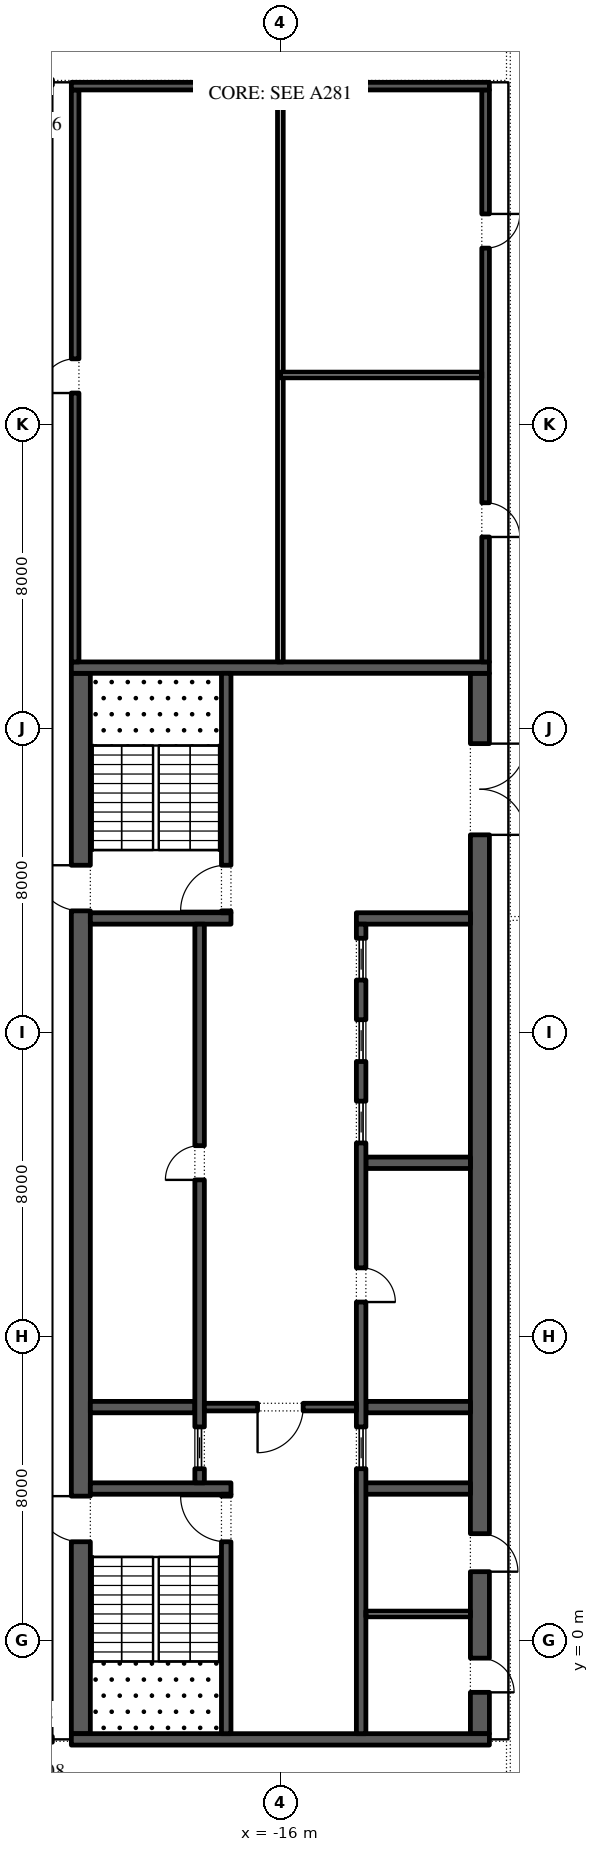
"""IFC4 building model, lengths in metres.
Left out: names, types, materials, properties, quantities, classifications, styles, units other than length and angle.
Written with IfcOpenShell. Run it as: python <this file> out.ifc"""

import sys

from ifc_helpers import new_model, si_unit, direction, frame, frame_2d, origin, place, context, subcontext, project, spatial, rectangle, extrude, element, fill, save


model = new_model("IFC4")
c1 = context("Model", 3, precision=1e-05, world=origin(), true_north=direction((0.0, 1.0)))
c2 = subcontext(c1, "Body", "Model", "MODEL_VIEW")
j1 = project(units=[si_unit("LENGTHUNIT", "METRE"), si_unit("PLANEANGLEUNIT", "RADIAN")], contexts=[c1])
p1 = place(None, origin())
s1 = spatial("IfcSite", under=j1, at=p1, CompositionType="ELEMENT")
p2 = place(p1, origin())
s2 = spatial("IfcBuilding", under=s1, at=p2, CompositionType="ELEMENT")
p3 = place(p2, frame((0.0, 0.0, 355.2)))
s3 = spatial("IfcBuildingStorey", under=s2, at=p3, CompositionType="ELEMENT", Elevation=355.2)
p4 = place(p3, frame((-21.25, -2.45, 0.0), z_axis=(0.0, 0.0, 1.0), x_axis=(0.0, 1.0, 0.0)))
e1 = element("IfcWall", 1, at=p4, inside=s3, PredefinedType="SHEAR", context=c2, shape_type="SweptSolid", body=[
    extrude(rectangle(XDim=27.9, YDim=0.5, at=frame_2d((13.95, 0.0))), origin(), (0.0, 0.0, 1.0), 3.95),
])
p5 = place(p4, frame((5.05, 0.0, 0.0)))
e2 = element("IfcOpeningElement", 2, at=p5, cuts=e1, PredefinedType="OPENING", context=c2, shape_type="SweptSolid", body=[
    extrude(rectangle(XDim=1.2, YDim=2.1, at=frame_2d((0.6, 1.05))), frame((0.0, 0.26, 0.0), z_axis=(0.0, -1.0, 0.0), x_axis=(1.0, 0.0, 0.0)), (0.0, 0.0, 1.0), 0.52),
])
p6 = place(p4, frame((21.65, 0.0, 0.0)))
e3 = element("IfcOpeningElement", 3, at=p6, cuts=e1, PredefinedType="OPENING", context=c2, shape_type="SweptSolid", body=[
    extrude(rectangle(XDim=1.2, YDim=2.1, at=frame_2d((0.6, 1.05))), frame((0.0, 0.26, 0.0), z_axis=(0.0, -1.0, 0.0), x_axis=(1.0, 0.0, 0.0)), (0.0, 0.0, 1.0), 0.52),
])
p7 = place(p3, frame((-10.75, -2.45, 0.0), z_axis=(0.0, 0.0, 1.0), x_axis=(0.0, 1.0, 0.0)))
e4 = element("IfcWall", 4, at=p7, inside=s3, PredefinedType="SHEAR", context=c2, shape_type="SweptSolid", body=[
    extrude(rectangle(XDim=27.9, YDim=0.5, at=frame_2d((13.95, 0.0))), origin(), (0.0, 0.0, 1.0), 3.95),
])
p8 = place(p7, frame((23.65, 0.0, 0.0)))
e5 = element("IfcOpeningElement", 5, at=p8, cuts=e4, PredefinedType="OPENING", context=c2, shape_type="SweptSolid", body=[
    extrude(rectangle(XDim=2.4, YDim=2.1, at=frame_2d((1.2, 1.05))), frame((0.0, 0.26, 0.0), z_axis=(0.0, -1.0, 0.0), x_axis=(1.0, 0.0, 0.0)), (0.0, 0.0, 1.0), 0.52),
])
p9 = place(p7, frame((1.087, 0.0, 0.0)))
e6 = element("IfcOpeningElement", 6, at=p9, cuts=e4, PredefinedType="OPENING", context=c2, shape_type="SweptSolid", body=[
    extrude(rectangle(XDim=0.9, YDim=2.1, at=frame_2d((0.45, 1.05))), frame((0.0, 0.26, 0.0), z_axis=(0.0, -1.0, 0.0), x_axis=(1.0, 0.0, 0.0)), (0.0, 0.0, 1.0), 0.52),
])
p10 = place(p7, frame((4.262, 0.0, 0.0)))
e7 = element("IfcOpeningElement", 7, at=p10, cuts=e4, PredefinedType="OPENING", context=c2, shape_type="SweptSolid", body=[
    extrude(rectangle(XDim=1.0, YDim=2.1, at=frame_2d((0.5, 1.05))), frame((0.0, 0.26, 0.0), z_axis=(0.0, -1.0, 0.0), x_axis=(1.0, 0.0, 0.0)), (0.0, 0.0, 1.0), 0.52),
])
for number, where, z_axis, x_axis in (
    (8, (-21.5, -2.6, 0.0), (0.0, 0.0, 1.0), (1.0, 0.0, 0.0)),
    (9, (-21.5, 25.6, 0.0), (0.0, 0.0, 1.0), (1.0, 0.0, 0.0)),
):
    element("IfcWall", number, at=place(p3, frame(where, z_axis=z_axis, x_axis=x_axis)), inside=s3, PredefinedType="SHEAR", context=c2, shape_type="SweptSolid", body=[
        extrude(rectangle(XDim=11.0, YDim=0.3, at=frame_2d((5.5, 0.0))), origin(), (0.0, 0.0, 1.0), 3.95),
    ])
p11 = place(p3, frame((-21.0, 4.0, 0.0), z_axis=(0.0, 0.0, 1.0), x_axis=(1.0, 0.0, 0.0)))
e10 = element("IfcWall", 10, at=p11, inside=s3, PredefinedType="SHEAR", context=c2, shape_type="SweptSolid", body=[
    extrude(rectangle(XDim=3.7, YDim=0.3, at=frame_2d((1.85, 0.0))), origin(), (0.0, 0.0, 1.0), 3.95),
])
p12 = place(p3, frame((-17.425, -2.45, 0.0), z_axis=(0.0, 0.0, 1.0), x_axis=(0.0, 1.0, 0.0)))
e11 = element("IfcWall", 11, at=p12, inside=s3, PredefinedType="SHEAR", context=c2, shape_type="SweptSolid", body=[
    extrude(rectangle(XDim=6.3, YDim=0.25, at=frame_2d((3.15, 0.0))), origin(), (0.0, 0.0, 1.0), 3.95),
])
p13 = place(p12, frame((5.05, 0.0, 0.0)))
e12 = element("IfcOpeningElement", 12, at=p13, cuts=e11, PredefinedType="OPENING", context=c2, shape_type="SweptSolid", body=[
    extrude(rectangle(XDim=1.2, YDim=2.1, at=frame_2d((0.6, 1.05))), frame((0.0, 0.135, 0.0), z_axis=(0.0, -1.0, 0.0), x_axis=(1.0, 0.0, 0.0)), (0.0, 0.0, 1.0), 0.27),
])
p14 = place(p3, frame((-21.0, 19.0, 0.0), z_axis=(0.0, 0.0, 1.0), x_axis=(1.0, 0.0, 0.0)))
e13 = element("IfcWall", 13, at=p14, inside=s3, PredefinedType="SHEAR", context=c2, shape_type="SweptSolid", body=[
    extrude(rectangle(XDim=3.7, YDim=0.3, at=frame_2d((1.85, 0.0))), origin(), (0.0, 0.0, 1.0), 3.95),
])
p15 = place(p3, frame((-17.425, 19.15, 0.0), z_axis=(0.0, 0.0, 1.0), x_axis=(0.0, 1.0, 0.0)))
e14 = element("IfcWall", 14, at=p15, inside=s3, PredefinedType="SHEAR", context=c2, shape_type="SweptSolid", body=[
    extrude(rectangle(XDim=6.3, YDim=0.25, at=frame_2d((3.15, 0.0))), origin(), (0.0, 0.0, 1.0), 3.95),
])
p16 = place(p15, frame((0.05, 0.0, 0.0)))
e15 = element("IfcOpeningElement", 15, at=p16, cuts=e14, PredefinedType="OPENING", context=c2, shape_type="SweptSolid", body=[
    extrude(rectangle(XDim=1.2, YDim=2.1, at=frame_2d((0.6, 1.05))), frame((0.0, 0.135, 0.0), z_axis=(0.0, -1.0, 0.0), x_axis=(1.0, 0.0, 0.0)), (0.0, 0.0, 1.0), 0.27),
])
p17 = place(p3, frame((-21.0, 6.143, 0.0), z_axis=(0.0, 0.0, 1.0), x_axis=(1.0, 0.0, 0.0)))
e16 = element("IfcWall", 16, at=p17, inside=s3, PredefinedType="SHEAR", context=c2, shape_type="SweptSolid", body=[
    extrude(rectangle(XDim=2.75, YDim=0.3, at=frame_2d((1.375, 0.0))), origin(), (0.0, 0.0, 1.0), 3.95),
])
p18 = place(p3, frame((-18.125, 4.15, 0.0), z_axis=(0.0, 0.0, 1.0), x_axis=(0.0, 1.0, 0.0)))
e17 = element("IfcWall", 17, at=p18, inside=s3, PredefinedType="SHEAR", context=c2, shape_type="SweptSolid", body=[
    extrude(rectangle(XDim=14.7, YDim=0.25, at=frame_2d((7.35, 0.0))), origin(), (0.0, 0.0, 1.0), 3.95),
])
p19 = place(p18, frame((7.971, 0.0, 0.0)))
e18 = element("IfcOpeningElement", 18, at=p19, cuts=e17, PredefinedType="OPENING", context=c2, shape_type="SweptSolid", body=[
    extrude(rectangle(XDim=0.9, YDim=2.1, at=frame_2d((0.45, 1.05))), frame((0.0, 0.135, 0.0), z_axis=(0.0, -1.0, 0.0), x_axis=(1.0, 0.0, 0.0)), (0.0, 0.0, 1.0), 0.27),
])
p20 = place(p18, frame((0.371, 0.0, 0.0)))
e19 = element("IfcOpeningElement", 19, at=p20, cuts=e17, PredefinedType="OPENING", context=c2, shape_type="SweptSolid", body=[
    extrude(rectangle(XDim=1.1, YDim=2.1, at=frame_2d((0.55, 1.05))), frame((0.0, 0.135, 0.0), z_axis=(0.0, -1.0, 0.0), x_axis=(1.0, 0.0, 0.0)), (0.0, 0.0, 1.0), 0.27),
])
p21 = place(p3, frame((-14.0, 4.0, 0.0), z_axis=(0.0, 0.0, 1.0), x_axis=(1.0, 0.0, 0.0)))
e20 = element("IfcWall", 20, at=p21, inside=s3, PredefinedType="SHEAR", context=c2, shape_type="SweptSolid", body=[
    extrude(rectangle(XDim=3.0, YDim=0.3, at=frame_2d((1.5, 0.0))), origin(), (0.0, 0.0, 1.0), 3.95),
])
for number, where, z_axis, x_axis in (
    (21, (-13.75, 6.143, 0.0), (0.0, 0.0, 1.0), (1.0, 0.0, 0.0)),
    (22, (-13.75, 12.571, 0.0), (0.0, 0.0, 1.0), (1.0, 0.0, 0.0)),
):
    element("IfcWall", number, at=place(p3, frame(where, z_axis=z_axis, x_axis=x_axis)), inside=s3, PredefinedType="SHEAR", context=c2, shape_type="SweptSolid", body=[
        extrude(rectangle(XDim=2.75, YDim=0.3, at=frame_2d((1.375, 0.0))), origin(), (0.0, 0.0, 1.0), 3.95),
    ])
p22 = place(p3, frame((-14.0, 19.0, 0.0), z_axis=(0.0, 0.0, 1.0), x_axis=(1.0, 0.0, 0.0)))
e23 = element("IfcWall", 23, at=p22, inside=s3, PredefinedType="SHEAR", context=c2, shape_type="SweptSolid", body=[
    extrude(rectangle(XDim=3.0, YDim=0.3, at=frame_2d((1.5, 0.0))), origin(), (0.0, 0.0, 1.0), 3.95),
])
p23 = place(p3, frame((-13.875, -2.45, 0.0), z_axis=(0.0, 0.0, 1.0), x_axis=(0.0, 1.0, 0.0)))
e24 = element("IfcWall", 24, at=p23, inside=s3, PredefinedType="SHEAR", context=c2, shape_type="SweptSolid", body=[
    extrude(rectangle(XDim=21.3, YDim=0.25, at=frame_2d((10.65, 0.0))), origin(), (0.0, 0.0, 1.0), 3.95),
])
p24 = place(p23, frame((11.357, 0.0, 0.0)))
e25 = element("IfcOpeningElement", 25, at=p24, cuts=e24, PredefinedType="OPENING", context=c2, shape_type="SweptSolid", body=[
    extrude(rectangle(XDim=0.9, YDim=2.1, at=frame_2d((0.45, 1.05))), frame((0.0, 0.135, 0.0), z_axis=(0.0, -1.0, 0.0), x_axis=(1.0, 0.0, 0.0)), (0.0, 0.0, 1.0), 0.27),
])
p25 = place(p23, frame((6.971, 0.0, 0.0)))
e26 = element("IfcOpeningElement", 26, at=p25, cuts=e24, PredefinedType="OPENING", context=c2, shape_type="SweptSolid", body=[
    extrude(rectangle(XDim=1.1, YDim=2.1, at=frame_2d((0.55, 1.05))), frame((0.0, 0.135, 0.0), z_axis=(0.0, -1.0, 0.0), x_axis=(1.0, 0.0, 0.0)), (0.0, 0.0, 1.0), 0.27),
])
p26 = place(p23, frame((15.543, 0.0, 0.0)))
e27 = element("IfcOpeningElement", 27, at=p26, cuts=e24, PredefinedType="OPENING", context=c2, shape_type="SweptSolid", body=[
    extrude(rectangle(XDim=1.1, YDim=2.1, at=frame_2d((0.55, 1.05))), frame((0.0, 0.135, 0.0), z_axis=(0.0, -1.0, 0.0), x_axis=(1.0, 0.0, 0.0)), (0.0, 0.0, 1.0), 0.27),
])
p27 = place(p23, frame((17.686, 0.0, 0.0)))
e28 = element("IfcOpeningElement", 28, at=p27, cuts=e24, PredefinedType="OPENING", context=c2, shape_type="SweptSolid", body=[
    extrude(rectangle(XDim=1.1, YDim=2.1, at=frame_2d((0.55, 1.05))), frame((0.0, 0.135, 0.0), z_axis=(0.0, -1.0, 0.0), x_axis=(1.0, 0.0, 0.0)), (0.0, 0.0, 1.0), 0.27),
])
p28 = place(p23, frame((19.829, 0.0, 0.0)))
e29 = element("IfcOpeningElement", 29, at=p28, cuts=e24, PredefinedType="OPENING", context=c2, shape_type="SweptSolid", body=[
    extrude(rectangle(XDim=1.1, YDim=2.1, at=frame_2d((0.55, 1.05))), frame((0.0, 0.135, 0.0), z_axis=(0.0, -1.0, 0.0), x_axis=(1.0, 0.0, 0.0)), (0.0, 0.0, 1.0), 0.27),
])
p29 = place(p3, frame((-18.0, 6.143, 0.0), z_axis=(0.0, 0.0, 1.0), x_axis=(1.0, 0.0, 0.0)))
e30 = element("IfcWall", 30, at=p29, inside=s3, PredefinedType="SHEAR", context=c2, shape_type="SweptSolid", body=[
    extrude(rectangle(XDim=4.0, YDim=0.2, at=frame_2d((2.0, 0.0))), origin(), (0.0, 0.0, 1.0), 3.95),
])
p30 = place(p29, frame((1.4, 0.0, 0.0)))
e31 = element("IfcOpeningElement", 31, at=p30, cuts=e30, PredefinedType="OPENING", context=c2, shape_type="SweptSolid", body=[
    extrude(rectangle(XDim=1.2, YDim=2.1, at=frame_2d((0.6, 1.05))), frame((0.0, 0.11, 0.0), z_axis=(0.0, -1.0, 0.0), x_axis=(1.0, 0.0, 0.0)), (0.0, 0.0, 1.0), 0.22),
])
p31 = place(p3, frame((-13.75, 0.7, 0.0), z_axis=(0.0, 0.0, 1.0), x_axis=(1.0, 0.0, 0.0)))
e32 = element("IfcWall", 32, at=p31, inside=s3, PredefinedType="PARTITIONING", context=c2, shape_type="SweptSolid", body=[
    extrude(rectangle(XDim=2.75, YDim=0.15, at=frame_2d((1.375, 0.0))), origin(), (0.0, 0.0, 1.0), 3.95),
])
p32 = place(p3, frame((-21.4, 25.75, 0.0), z_axis=(0.0, 0.0, 1.0), x_axis=(0.0, 1.0, 0.0)))
e33 = element("IfcWall", 33, at=p32, inside=s3, PredefinedType="SHEAR", context=c2, shape_type="SweptSolid", body=[
    extrude(rectangle(XDim=15.05, YDim=0.2, at=frame_2d((7.525, 0.0))), origin(), (0.0, 0.0, 1.0), 3.95),
])
p33 = place(p32, frame((7.075, 0.0, 0.0)))
e34 = element("IfcOpeningElement", 34, at=p33, cuts=e33, PredefinedType="OPENING", context=c2, shape_type="SweptSolid", body=[
    extrude(rectangle(XDim=0.9, YDim=2.1, at=frame_2d((0.45, 1.05))), frame((0.0, 0.11, 0.0), z_axis=(0.0, -1.0, 0.0), x_axis=(1.0, 0.0, 0.0)), (0.0, 0.0, 1.0), 0.22),
])
p34 = place(p3, frame((-10.6, 25.75, 0.0), z_axis=(0.0, 0.0, 1.0), x_axis=(0.0, 1.0, 0.0)))
e35 = element("IfcWall", 35, at=p34, inside=s3, PredefinedType="SHEAR", context=c2, shape_type="SweptSolid", body=[
    extrude(rectangle(XDim=15.05, YDim=0.2, at=frame_2d((7.525, 0.0))), origin(), (0.0, 0.0, 1.0), 3.95),
])
p35 = place(p34, frame((3.288, 0.0, 0.0)))
e36 = element("IfcOpeningElement", 36, at=p35, cuts=e35, PredefinedType="OPENING", context=c2, shape_type="SweptSolid", body=[
    extrude(rectangle(XDim=0.9, YDim=2.1, at=frame_2d((0.45, 1.05))), frame((0.0, 0.11, 0.0), z_axis=(0.0, -1.0, 0.0), x_axis=(1.0, 0.0, 0.0)), (0.0, 0.0, 1.0), 0.22),
])
p36 = place(p34, frame((10.887, 0.0, 0.0)))
e37 = element("IfcOpeningElement", 37, at=p36, cuts=e35, PredefinedType="OPENING", context=c2, shape_type="SweptSolid", body=[
    extrude(rectangle(XDim=0.9, YDim=2.1, at=frame_2d((0.45, 1.05))), frame((0.0, 0.11, 0.0), z_axis=(0.0, -1.0, 0.0), x_axis=(1.0, 0.0, 0.0)), (0.0, 0.0, 1.0), 0.22),
])
p37 = place(p3, frame((-21.5, 40.9, 0.0), z_axis=(0.0, 0.0, 1.0), x_axis=(1.0, 0.0, 0.0)))
e38 = element("IfcWall", 38, at=p37, inside=s3, PredefinedType="SHEAR", context=c2, shape_type="SweptSolid", body=[
    extrude(rectangle(XDim=11.0, YDim=0.2, at=frame_2d((5.5, 0.0))), origin(), (0.0, 0.0, 1.0), 3.95),
])
p38 = place(p3, frame((-16.0, 25.75, 0.0), z_axis=(0.0, 0.0, 1.0), x_axis=(0.0, 1.0, 0.0)))
e39 = element("IfcWall", 39, at=p38, inside=s3, PredefinedType="PARTITIONING", context=c2, shape_type="SweptSolid", body=[
    extrude(rectangle(XDim=15.05, YDim=0.15, at=frame_2d((7.525, 0.0))), origin(), (0.0, 0.0, 1.0), 3.95),
])
p39 = place(p3, frame((-16.0, 33.3, 0.0), z_axis=(0.0, 0.0, 1.0), x_axis=(1.0, 0.0, 0.0)))
e40 = element("IfcWall", 40, at=p39, inside=s3, PredefinedType="PARTITIONING", context=c2, shape_type="SweptSolid", body=[
    extrude(rectangle(XDim=5.3, YDim=0.15, at=frame_2d((2.65, 0.0))), origin(), (0.0, 0.0, 1.0), 3.95),
])
p40 = place(p3, frame((-22.0, 41.0, 0.0), z_axis=(0.0, 0.0, 1.0), x_axis=(-1.0, 0.0, 0.0)))
e41 = element("IfcWall", 41, at=p40, inside=s3, PredefinedType="PARTITIONING", context=c2, shape_type="SweptSolid", body=[
    extrude(rectangle(XDim=4.05, YDim=0.15, at=frame_2d((2.025, 0.0))), origin(), (0.0, 0.0, 1.0), 3.95),
])
p41 = place(p40, frame((2.6, 0.0, 0.0)))
e42 = element("IfcOpeningElement", 42, at=p41, cuts=e41, PredefinedType="OPENING", context=c2, shape_type="SweptSolid", body=[
    extrude(rectangle(XDim=1.0, YDim=2.1, at=frame_2d((0.5, 1.05))), frame((0.0, 0.085, 0.0), z_axis=(0.0, -1.0, 0.0), x_axis=(1.0, 0.0, 0.0)), (0.0, 0.0, 1.0), 0.17),
])
p42 = place(p19, origin())
e43 = element("IfcDoor", 43, at=p42, inside=s3, OperationType="SINGLE_SWING_RIGHT", PredefinedType="DOOR", context=c2, shape_type="SweptSolid", body=[
    extrude(rectangle(XDim=0.9, YDim=2.1, at=frame_2d((0.45, 1.05))), frame((0.0, 0.125, 0.0), z_axis=(0.0, -1.0, 0.0), x_axis=(1.0, 0.0, 0.0)), (0.0, 0.0, 1.0), 0.05),
])
fill(e18, e43)
p43 = place(p20, origin())
e44 = element("IfcDoor", 44, at=p43, inside=s3, OperationType="SLIDING_TO_LEFT", PredefinedType="DOOR", context=c2, shape_type="SweptSolid", body=[
    extrude(rectangle(XDim=1.1, YDim=2.1, at=frame_2d((0.55, 1.05))), frame((0.0, 0.025, 0.0), z_axis=(0.0, -1.0, 0.0), x_axis=(1.0, 0.0, 0.0)), (0.0, 0.0, 1.0), 0.05),
])
fill(e19, e44)
p44 = place(p24, frame((0.9, -0.2, 0.0), z_axis=(0.0, 0.0, 1.0), x_axis=(-1.0, 0.0, 0.0)))
e45 = element("IfcDoor", 45, at=p44, inside=s3, OperationType="SINGLE_SWING_LEFT", PredefinedType="DOOR", context=c2, shape_type="SweptSolid", body=[
    extrude(rectangle(XDim=0.9, YDim=2.1, at=frame_2d((0.45, 1.05))), frame((0.0, -0.075, 0.0), z_axis=(0.0, -1.0, 0.0), x_axis=(1.0, 0.0, 0.0)), (0.0, 0.0, 1.0), 0.05),
])
fill(e25, e45)
p45 = place(p25, origin())
e46 = element("IfcDoor", 46, at=p45, inside=s3, OperationType="SLIDING_TO_LEFT", PredefinedType="DOOR", context=c2, shape_type="SweptSolid", body=[
    extrude(rectangle(XDim=1.1, YDim=2.1, at=frame_2d((0.55, 1.05))), frame((0.0, 0.025, 0.0), z_axis=(0.0, -1.0, 0.0), x_axis=(1.0, 0.0, 0.0)), (0.0, 0.0, 1.0), 0.05),
])
fill(e26, e46)
p46 = place(p26, origin())
e47 = element("IfcDoor", 47, at=p46, inside=s3, OperationType="SLIDING_TO_LEFT", PredefinedType="DOOR", context=c2, shape_type="SweptSolid", body=[
    extrude(rectangle(XDim=1.1, YDim=2.1, at=frame_2d((0.55, 1.05))), frame((0.0, 0.025, 0.0), z_axis=(0.0, -1.0, 0.0), x_axis=(1.0, 0.0, 0.0)), (0.0, 0.0, 1.0), 0.05),
])
fill(e27, e47)
p47 = place(p27, origin())
e48 = element("IfcDoor", 48, at=p47, inside=s3, OperationType="SLIDING_TO_LEFT", PredefinedType="DOOR", context=c2, shape_type="SweptSolid", body=[
    extrude(rectangle(XDim=1.1, YDim=2.1, at=frame_2d((0.55, 1.05))), frame((0.0, 0.025, 0.0), z_axis=(0.0, -1.0, 0.0), x_axis=(1.0, 0.0, 0.0)), (0.0, 0.0, 1.0), 0.05),
])
fill(e28, e48)
p48 = place(p28, origin())
e49 = element("IfcDoor", 49, at=p48, inside=s3, OperationType="SLIDING_TO_LEFT", PredefinedType="DOOR", context=c2, shape_type="SweptSolid", body=[
    extrude(rectangle(XDim=1.1, YDim=2.1, at=frame_2d((0.55, 1.05))), frame((0.0, 0.025, 0.0), z_axis=(0.0, -1.0, 0.0), x_axis=(1.0, 0.0, 0.0)), (0.0, 0.0, 1.0), 0.05),
])
fill(e29, e49)
p49 = place(p30, frame((1.2, 0.0, 0.0), z_axis=(0.0, 0.0, 1.0), x_axis=(-1.0, 0.0, 0.0)))
e50 = element("IfcDoor", 50, at=p49, inside=s3, OperationType="SINGLE_SWING_LEFT", PredefinedType="DOOR", context=c2, shape_type="SweptSolid", body=[
    extrude(rectangle(XDim=1.2, YDim=2.1, at=frame_2d((0.6, 1.05))), frame((0.0, 0.025, 0.0), z_axis=(0.0, -1.0, 0.0), x_axis=(1.0, 0.0, 0.0)), (0.0, 0.0, 1.0), 0.05),
])
fill(e31, e50)
p50 = place(p8, frame((2.4, 0.0, 0.0), z_axis=(0.0, 0.0, 1.0), x_axis=(-1.0, 0.0, 0.0)))
e51 = element("IfcDoor", 51, at=p50, inside=s3, OperationType="DOUBLE_DOOR_SINGLE_SWING", PredefinedType="DOOR", context=c2, shape_type="SweptSolid", body=[
    extrude(rectangle(XDim=2.4, YDim=2.1, at=frame_2d((1.2, 1.05))), frame((0.0, 0.025, 0.0), z_axis=(0.0, -1.0, 0.0), x_axis=(1.0, 0.0, 0.0)), (0.0, 0.0, 1.0), 0.05),
])
fill(e5, e51)
p51 = place(p13, origin())
e52 = element("IfcDoor", 52, at=p51, inside=s3, OperationType="SINGLE_SWING_LEFT", PredefinedType="DOOR", context=c2, shape_type="SweptSolid", body=[
    extrude(rectangle(XDim=1.2, YDim=2.1, at=frame_2d((0.6, 1.05))), frame((0.0, 0.025, 0.0), z_axis=(0.0, -1.0, 0.0), x_axis=(1.0, 0.0, 0.0)), (0.0, 0.0, 1.0), 0.05),
])
fill(e12, e52)
p52 = place(p5, origin())
e53 = element("IfcDoor", 53, at=p52, inside=s3, OperationType="SINGLE_SWING_LEFT", PredefinedType="DOOR", context=c2, shape_type="SweptSolid", body=[
    extrude(rectangle(XDim=1.2, YDim=2.1, at=frame_2d((0.6, 1.05))), frame((0.0, 0.025, 0.0), z_axis=(0.0, -1.0, 0.0), x_axis=(1.0, 0.0, 0.0)), (0.0, 0.0, 1.0), 0.05),
])
fill(e2, e53)
p53 = place(p16, origin())
e54 = element("IfcDoor", 54, at=p53, inside=s3, OperationType="SINGLE_SWING_RIGHT", PredefinedType="DOOR", context=c2, shape_type="SweptSolid", body=[
    extrude(rectangle(XDim=1.2, YDim=2.1, at=frame_2d((0.6, 1.05))), frame((0.0, 0.025, 0.0), z_axis=(0.0, -1.0, 0.0), x_axis=(1.0, 0.0, 0.0)), (0.0, 0.0, 1.0), 0.05),
])
fill(e15, e54)
p54 = place(p6, origin())
e55 = element("IfcDoor", 55, at=p54, inside=s3, OperationType="SINGLE_SWING_LEFT", PredefinedType="DOOR", context=c2, shape_type="SweptSolid", body=[
    extrude(rectangle(XDim=1.2, YDim=2.1, at=frame_2d((0.6, 1.05))), frame((0.0, 0.025, 0.0), z_axis=(0.0, -1.0, 0.0), x_axis=(1.0, 0.0, 0.0)), (0.0, 0.0, 1.0), 0.05),
])
fill(e3, e55)
p55 = place(p9, frame((0.9, 0.45, 0.0), z_axis=(0.0, 0.0, 1.0), x_axis=(-1.0, 0.0, 0.0)))
e56 = element("IfcDoor", 56, at=p55, inside=s3, OperationType="SINGLE_SWING_LEFT", PredefinedType="DOOR", context=c2, shape_type="SweptSolid", body=[
    extrude(rectangle(XDim=0.9, YDim=2.1, at=frame_2d((0.45, 1.05))), frame((0.0, 0.25, 0.0), z_axis=(0.0, -1.0, 0.0), x_axis=(1.0, 0.0, 0.0)), (0.0, 0.0, 1.0), 0.05),
])
fill(e6, e56)
p56 = place(p10, frame((1.0, 0.45, 0.0), z_axis=(0.0, 0.0, 1.0), x_axis=(-1.0, 0.0, 0.0)))
e57 = element("IfcDoor", 57, at=p56, inside=s3, OperationType="SINGLE_SWING_LEFT", PredefinedType="DOOR", context=c2, shape_type="SweptSolid", body=[
    extrude(rectangle(XDim=1.0, YDim=2.1, at=frame_2d((0.5, 1.05))), frame((0.0, 0.25, 0.0), z_axis=(0.0, -1.0, 0.0), x_axis=(1.0, 0.0, 0.0)), (0.0, 0.0, 1.0), 0.05),
])
fill(e7, e57)
p57 = place(p33, origin())
e58 = element("IfcDoor", 58, at=p57, inside=s3, OperationType="SINGLE_SWING_RIGHT", PredefinedType="DOOR", context=c2, shape_type="SweptSolid", body=[
    extrude(rectangle(XDim=0.9, YDim=2.1, at=frame_2d((0.45, 1.05))), frame((0.0, -0.05, 0.0), z_axis=(0.0, -1.0, 0.0), x_axis=(1.0, 0.0, 0.0)), (0.0, 0.0, 1.0), 0.05),
])
fill(e34, e58)
p58 = place(p35, frame((0.9, 0.15, 0.0), z_axis=(0.0, 0.0, 1.0), x_axis=(-1.0, 0.0, 0.0)))
e59 = element("IfcDoor", 59, at=p58, inside=s3, OperationType="SINGLE_SWING_LEFT", PredefinedType="DOOR", context=c2, shape_type="SweptSolid", body=[
    extrude(rectangle(XDim=0.9, YDim=2.1, at=frame_2d((0.45, 1.05))), frame((0.0, 0.1, 0.0), z_axis=(0.0, -1.0, 0.0), x_axis=(1.0, 0.0, 0.0)), (0.0, 0.0, 1.0), 0.05),
])
fill(e36, e59)
p59 = place(p36, frame((0.9, 0.15, 0.0), z_axis=(0.0, 0.0, 1.0), x_axis=(-1.0, 0.0, 0.0)))
e60 = element("IfcDoor", 60, at=p59, inside=s3, OperationType="SINGLE_SWING_RIGHT", PredefinedType="DOOR", context=c2, shape_type="SweptSolid", body=[
    extrude(rectangle(XDim=0.9, YDim=2.1, at=frame_2d((0.45, 1.05))), frame((0.0, 0.1, 0.0), z_axis=(0.0, -1.0, 0.0), x_axis=(1.0, 0.0, 0.0)), (0.0, 0.0, 1.0), 0.05),
])
fill(e37, e60)
save(model, sys.argv[1])
